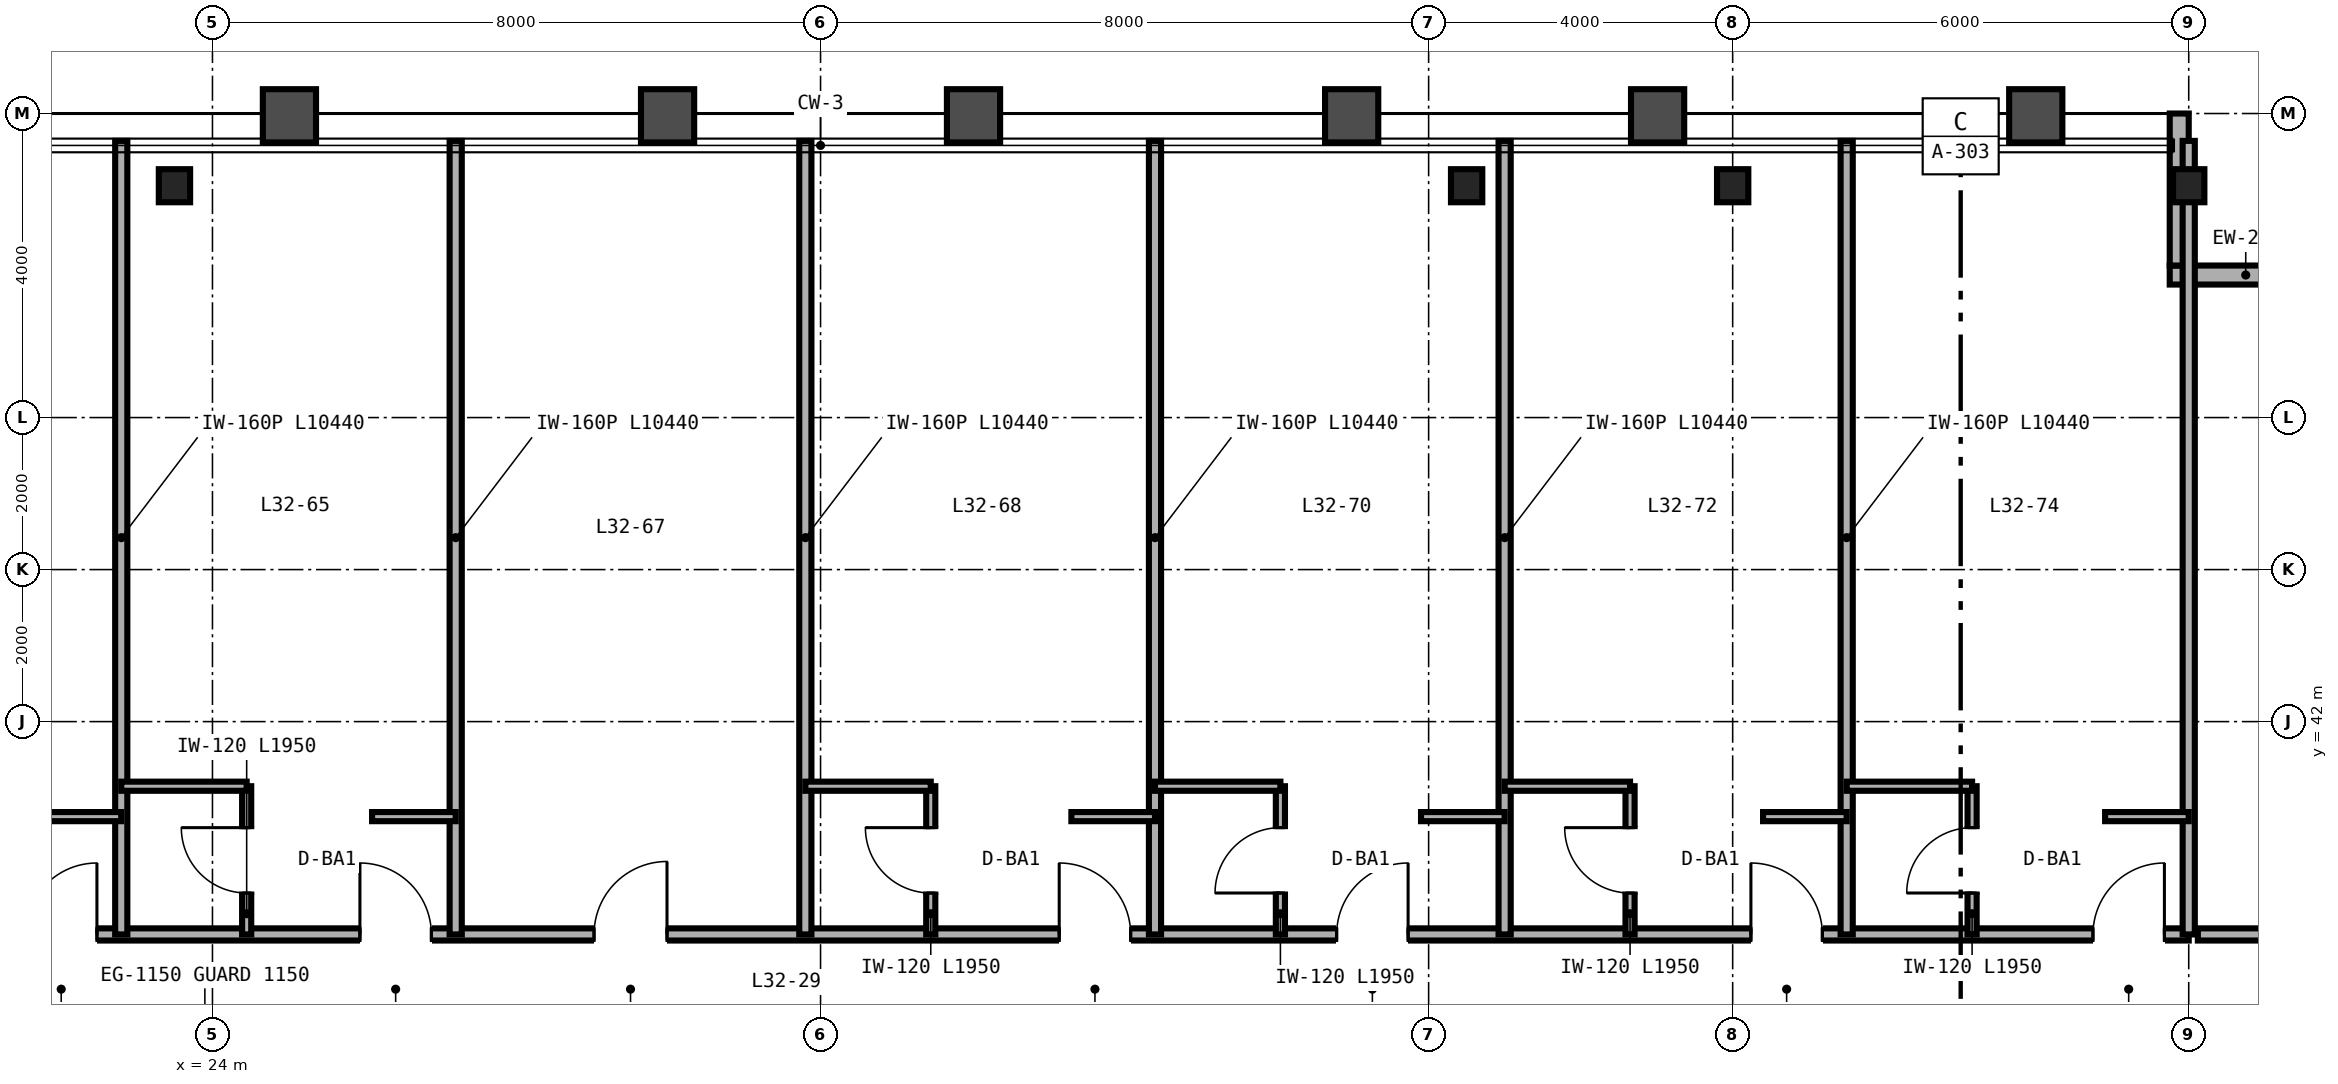
"""IFC4 building model, lengths in metres.
Left out: names, types, materials, properties, quantities, classifications, styles, units other than length and angle.
Written with IfcOpenShell. Run it as: python <this file> out.ifc"""

import sys

from ifc_helpers import new_model, si_unit, direction, frame, frame_2d, origin, origin_2d, place, context, subcontext, project, spatial, rectangle, i_section, extrude, source, transform, mapped, element, fill, save


model = new_model("IFC4")
c1 = context("Model", 3, precision=1e-05, world=origin(), true_north=direction((0.0, 1.0)))
c2 = subcontext(c1, "Body", "Model", "MODEL_VIEW")
j1 = project(units=[si_unit("LENGTHUNIT", "METRE"), si_unit("PLANEANGLEUNIT", "RADIAN")], contexts=[c1])
p1 = place(None, origin())
s1 = spatial("IfcSite", under=j1, at=p1, CompositionType="ELEMENT")
p2 = place(p1, origin())
s2 = spatial("IfcBuilding", under=s1, at=p2, CompositionType="ELEMENT")
p3 = place(p2, frame((0.0, 0.0, 129.6)))
s3 = spatial("IfcBuildingStorey", under=s2, at=p3, CompositionType="ELEMENT", Elevation=129.6)
m1 = source(origin(), c2, "Body", "SweptSolid", [
    extrude(i_section(OverallWidth=0.412, OverallDepth=0.435, WebThickness=0.036, FlangeThickness=0.057, FilletRadius=0.025, at=origin_2d()), origin(), (0.0, 0.0, 1.0), 3.36),
])
for number, where, z_axis, x_axis in (
    (1, (23.5, 49.05, 0.0), (0.0, 0.0, 1.0), (1.0, 0.0, 0.0)),
    (2, (40.5, 49.05, 0.0), (0.0, 0.0, 1.0), (1.0, 0.0, 0.0)),
    (3, (44.0, 49.05, 0.0), (0.0, 0.0, 1.0), (1.0, 0.0, 0.0)),
    (4, (50.0, 49.05, 0.0), (0.0, 0.0, 1.0), (1.0, 0.0, 0.0)),
):
    element("IfcColumn", number, at=place(p3, frame(where, z_axis=z_axis, x_axis=x_axis)), inside=s3, PredefinedType="COLUMN", context=c2, shape_type="MappedRepresentation", body=[
        mapped(m1, transform((0.0, 0.0, 0.0), scale=1.0)),
    ])
p4 = place(p3, frame((51.75, 47.875, 0.0), z_axis=(0.0, 0.0, 1.0), x_axis=(-1.0, 0.0, 0.0)))
e5 = element("IfcWall", 5, at=p4, inside=s3, PredefinedType="SOLIDWALL", context=c2, shape_type="SweptSolid", body=[
    extrude(rectangle(XDim=2.0, YDim=0.25, at=frame_2d((1.0, 0.0))), origin(), (0.0, 0.0, 1.0), 3.36),
])
p5 = place(p3, frame((49.875, 48.0, 0.0), z_axis=(0.0, 0.0, 1.0), x_axis=(0.0, 1.0, 0.0)))
e6 = element("IfcWall", 6, at=p5, inside=s3, PredefinedType="SOLIDWALL", context=c2, shape_type="SweptSolid", body=[
    extrude(rectangle(XDim=2.0, YDim=0.25, at=frame_2d((1.0, 0.0))), origin(), (0.0, 0.0, 1.0), 2.667),
])
p6 = place(p3, frame((50.12, 39.2, 0.0), z_axis=(0.0, 0.0, 1.0), x_axis=(1.0, 0.0, 0.0)))
e7 = element("IfcWall", 7, at=p6, inside=s3, PredefinedType="PARTITIONING", context=c2, shape_type="SweptSolid", body=[
    extrude(rectangle(XDim=5.68, YDim=0.16, at=frame_2d((2.84, 0.0))), origin(), (0.0, 0.0, 1.0), 3.36),
])
p7 = place(p6, frame((2.36, 0.0, 0.0)))
e8 = element("IfcOpeningElement", 8, at=p7, cuts=e7, PredefinedType="OPENING", context=c2, shape_type="SweptSolid", body=[
    extrude(rectangle(XDim=0.96, YDim=2.15, at=frame_2d((0.48, 1.075))), frame((0.0, 0.09, 0.0), z_axis=(0.0, -1.0, 0.0), x_axis=(1.0, 0.0, 0.0)), (0.0, 0.0, 1.0), 0.18),
])
p8 = place(p3, frame((14.0, 39.2, 0.0), z_axis=(0.0, 0.0, 1.0), x_axis=(1.0, 0.0, 0.0)))
e9 = element("IfcWall", 9, at=p8, inside=s3, PredefinedType="PARTITIONING", context=c2, shape_type="SweptSolid", body=[
    extrude(rectangle(XDim=36.0, YDim=0.16, at=frame_2d((18.0, 0.0))), origin(), (0.0, 0.0, 1.0), 2.581),
])
p9 = place(p8, frame((3.14, 0.0, 0.0)))
e10 = element("IfcOpeningElement", 10, at=p9, cuts=e9, PredefinedType="OPENING", context=c2, shape_type="SweptSolid", body=[
    extrude(rectangle(XDim=0.94, YDim=2.15, at=frame_2d((0.47, 1.075))), frame((0.0, 0.09, 0.0), z_axis=(0.0, -1.0, 0.0), x_axis=(1.0, 0.0, 0.0)), (0.0, 0.0, 1.0), 0.18),
])
p10 = place(p8, frame((7.54, 0.0, 0.0)))
e11 = element("IfcOpeningElement", 11, at=p10, cuts=e9, PredefinedType="OPENING", context=c2, shape_type="SweptSolid", body=[
    extrude(rectangle(XDim=0.94, YDim=2.15, at=frame_2d((0.47, 1.075))), frame((0.0, 0.09, 0.0), z_axis=(0.0, -1.0, 0.0), x_axis=(1.0, 0.0, 0.0)), (0.0, 0.0, 1.0), 0.18),
])
p11 = place(p8, frame((11.94, 0.0, 0.0)))
e12 = element("IfcOpeningElement", 12, at=p11, cuts=e9, PredefinedType="OPENING", context=c2, shape_type="SweptSolid", body=[
    extrude(rectangle(XDim=0.94, YDim=2.15, at=frame_2d((0.47, 1.075))), frame((0.0, 0.09, 0.0), z_axis=(0.0, -1.0, 0.0), x_axis=(1.0, 0.0, 0.0)), (0.0, 0.0, 1.0), 0.18),
])
p12 = place(p8, frame((15.02, 0.0, 0.0)))
e13 = element("IfcOpeningElement", 13, at=p12, cuts=e9, PredefinedType="OPENING", context=c2, shape_type="SweptSolid", body=[
    extrude(rectangle(XDim=0.96, YDim=2.15, at=frame_2d((0.48, 1.075))), frame((0.0, 0.09, 0.0), z_axis=(0.0, -1.0, 0.0), x_axis=(1.0, 0.0, 0.0)), (0.0, 0.0, 1.0), 0.18),
])
p13 = place(p8, frame((21.14, 0.0, 0.0)))
e14 = element("IfcOpeningElement", 14, at=p13, cuts=e9, PredefinedType="OPENING", context=c2, shape_type="SweptSolid", body=[
    extrude(rectangle(XDim=0.94, YDim=2.15, at=frame_2d((0.47, 1.075))), frame((0.0, 0.09, 0.0), z_axis=(0.0, -1.0, 0.0), x_axis=(1.0, 0.0, 0.0)), (0.0, 0.0, 1.0), 0.18),
])
p14 = place(p8, frame((24.79, 0.0, 0.0)))
e15 = element("IfcOpeningElement", 15, at=p14, cuts=e9, PredefinedType="OPENING", context=c2, shape_type="SweptSolid", body=[
    extrude(rectangle(XDim=0.94, YDim=2.15, at=frame_2d((0.47, 1.075))), frame((0.0, 0.09, 0.0), z_axis=(0.0, -1.0, 0.0), x_axis=(1.0, 0.0, 0.0)), (0.0, 0.0, 1.0), 0.18),
])
p15 = place(p8, frame((30.24, 0.0, 0.0)))
e16 = element("IfcOpeningElement", 16, at=p15, cuts=e9, PredefinedType="OPENING", context=c2, shape_type="SweptSolid", body=[
    extrude(rectangle(XDim=0.94, YDim=2.15, at=frame_2d((0.47, 1.075))), frame((0.0, 0.09, 0.0), z_axis=(0.0, -1.0, 0.0), x_axis=(1.0, 0.0, 0.0)), (0.0, 0.0, 1.0), 0.18),
])
p16 = place(p8, frame((34.74, 0.0, 0.0)))
e17 = element("IfcOpeningElement", 17, at=p16, cuts=e9, PredefinedType="OPENING", context=c2, shape_type="SweptSolid", body=[
    extrude(rectangle(XDim=0.94, YDim=2.15, at=frame_2d((0.47, 1.075))), frame((0.0, 0.09, 0.0), z_axis=(0.0, -1.0, 0.0), x_axis=(1.0, 0.0, 0.0)), (0.0, 0.0, 1.0), 0.18),
])
p17 = place(p3, frame((50.0, 39.2, 0.0), z_axis=(0.0, 0.0, 1.0), x_axis=(0.0, 1.0, 0.0)))
e18 = element("IfcWall", 18, at=p17, inside=s3, PredefinedType="PARTITIONING", context=c2, shape_type="SweptSolid", body=[
    extrude(rectangle(XDim=10.44, YDim=0.16, at=frame_2d((5.22, 0.0))), origin(), (0.0, 0.0, 1.0), 2.667),
])
p18 = place(p3, frame((22.8, 39.2, 0.0), z_axis=(0.0, 0.0, 1.0), x_axis=(0.0, 1.0, 0.0)))
e19 = element("IfcWall", 19, at=p18, inside=s3, PredefinedType="PARTITIONING", context=c2, shape_type="SweptSolid", body=[
    extrude(rectangle(XDim=10.44, YDim=0.16, at=frame_2d((5.22, 0.0))), origin(), (0.0, 0.0, 1.0), 2.823),
])
p19 = place(p3, frame((21.7, 40.75, 0.0), z_axis=(0.0, 0.0, 1.0), x_axis=(1.0, 0.0, 0.0)))
e20 = element("IfcWall", 20, at=p19, inside=s3, PredefinedType="PARTITIONING", context=c2, shape_type="SweptSolid", body=[
    extrude(rectangle(XDim=1.1, YDim=0.12, at=frame_2d((0.55, 0.0))), origin(), (0.0, 0.0, 1.0), 3.36),
])
p20 = place(p3, frame((27.2, 39.2, 0.0), z_axis=(0.0, 0.0, 1.0), x_axis=(0.0, 1.0, 0.0)))
e21 = element("IfcWall", 21, at=p20, inside=s3, PredefinedType="PARTITIONING", context=c2, shape_type="SweptSolid", body=[
    extrude(rectangle(XDim=10.44, YDim=0.16, at=frame_2d((5.22, 0.0))), origin(), (0.0, 0.0, 1.0), 2.433),
])
p21 = place(p3, frame((24.45, 39.2, 0.0), z_axis=(0.0, 0.0, 1.0), x_axis=(0.0, 1.0, 0.0)))
e22 = element("IfcWall", 22, at=p21, inside=s3, PredefinedType="PARTITIONING", context=c2, shape_type="SweptSolid", body=[
    extrude(rectangle(XDim=1.95, YDim=0.12, at=frame_2d((0.975, 0.0))), origin(), (0.0, 0.0, 1.0), 3.36),
])
p22 = place(p21, frame((0.545, 0.0, 0.0)))
e23 = element("IfcOpeningElement", 23, at=p22, cuts=e22, PredefinedType="OPENING", context=c2, shape_type="SweptSolid", body=[
    extrude(rectangle(XDim=0.86, YDim=2.1, at=frame_2d((0.43, 1.05))), frame((0.0, 0.07, 0.0), z_axis=(0.0, -1.0, 0.0), x_axis=(1.0, 0.0, 0.0)), (0.0, 0.0, 1.0), 0.14),
])
p23 = place(p3, frame((22.8, 41.15, 0.0), z_axis=(0.0, 0.0, 1.0), x_axis=(1.0, 0.0, 0.0)))
e24 = element("IfcWall", 24, at=p23, inside=s3, PredefinedType="PARTITIONING", context=c2, shape_type="SweptSolid", body=[
    extrude(rectangle(XDim=1.65, YDim=0.12, at=frame_2d((0.825, 0.0))), origin(), (0.0, 0.0, 1.0), 2.581),
])
p24 = place(p3, frame((26.1, 40.75, 0.0), z_axis=(0.0, 0.0, 1.0), x_axis=(1.0, 0.0, 0.0)))
e25 = element("IfcWall", 25, at=p24, inside=s3, PredefinedType="PARTITIONING", context=c2, shape_type="SweptSolid", body=[
    extrude(rectangle(XDim=1.1, YDim=0.12, at=frame_2d((0.55, 0.0))), origin(), (0.0, 0.0, 1.0), 3.36),
])
for number, where, z_axis, x_axis in (
    (26, (31.8, 39.2, 0.0), (0.0, 0.0, 1.0), (0.0, 1.0, 0.0)),
    (27, (36.4, 39.2, 0.0), (0.0, 0.0, 1.0), (0.0, 1.0, 0.0)),
):
    element("IfcWall", number, at=place(p3, frame(where, z_axis=z_axis, x_axis=x_axis)), inside=s3, PredefinedType="PARTITIONING", context=c2, shape_type="SweptSolid", body=[
        extrude(rectangle(XDim=10.44, YDim=0.16, at=frame_2d((5.22, 0.0))), origin(), (0.0, 0.0, 1.0), 2.433),
    ])
p25 = place(p3, frame((33.45, 39.2, 0.0), z_axis=(0.0, 0.0, 1.0), x_axis=(0.0, 1.0, 0.0)))
e28 = element("IfcWall", 28, at=p25, inside=s3, PredefinedType="PARTITIONING", context=c2, shape_type="SweptSolid", body=[
    extrude(rectangle(XDim=1.95, YDim=0.12, at=frame_2d((0.975, 0.0))), origin(), (0.0, 0.0, 1.0), 3.36),
])
p26 = place(p25, frame((0.545, 0.0, 0.0)))
e29 = element("IfcOpeningElement", 29, at=p26, cuts=e28, PredefinedType="OPENING", context=c2, shape_type="SweptSolid", body=[
    extrude(rectangle(XDim=0.86, YDim=2.1, at=frame_2d((0.43, 1.05))), frame((0.0, 0.07, 0.0), z_axis=(0.0, -1.0, 0.0), x_axis=(1.0, 0.0, 0.0)), (0.0, 0.0, 1.0), 0.14),
])
p27 = place(p3, frame((31.8, 41.15, 0.0), z_axis=(0.0, 0.0, 1.0), x_axis=(1.0, 0.0, 0.0)))
e30 = element("IfcWall", 30, at=p27, inside=s3, PredefinedType="PARTITIONING", context=c2, shape_type="SweptSolid", body=[
    extrude(rectangle(XDim=1.65, YDim=0.12, at=frame_2d((0.825, 0.0))), origin(), (0.0, 0.0, 1.0), 3.36),
])
p28 = place(p3, frame((35.3, 40.75, 0.0), z_axis=(0.0, 0.0, 1.0), x_axis=(1.0, 0.0, 0.0)))
e31 = element("IfcWall", 31, at=p28, inside=s3, PredefinedType="PARTITIONING", context=c2, shape_type="SweptSolid", body=[
    extrude(rectangle(XDim=1.1, YDim=0.12, at=frame_2d((0.55, 0.0))), origin(), (0.0, 0.0, 1.0), 3.36),
])
p29 = place(p3, frame((41.0, 39.2, 0.0), z_axis=(0.0, 0.0, 1.0), x_axis=(0.0, 1.0, 0.0)))
e32 = element("IfcWall", 32, at=p29, inside=s3, PredefinedType="PARTITIONING", context=c2, shape_type="SweptSolid", body=[
    extrude(rectangle(XDim=10.44, YDim=0.16, at=frame_2d((5.22, 0.0))), origin(), (0.0, 0.0, 1.0), 2.823),
])
p30 = place(p3, frame((38.05, 39.2, 0.0), z_axis=(0.0, 0.0, 1.0), x_axis=(0.0, 1.0, 0.0)))
e33 = element("IfcWall", 33, at=p30, inside=s3, PredefinedType="PARTITIONING", context=c2, shape_type="SweptSolid", body=[
    extrude(rectangle(XDim=1.95, YDim=0.12, at=frame_2d((0.975, 0.0))), origin(), (0.0, 0.0, 1.0), 3.36),
])
p31 = place(p30, frame((0.545, 0.0, 0.0)))
e34 = element("IfcOpeningElement", 34, at=p31, cuts=e33, PredefinedType="OPENING", context=c2, shape_type="SweptSolid", body=[
    extrude(rectangle(XDim=0.86, YDim=2.1, at=frame_2d((0.43, 1.05))), frame((0.0, 0.07, 0.0), z_axis=(0.0, -1.0, 0.0), x_axis=(1.0, 0.0, 0.0)), (0.0, 0.0, 1.0), 0.14),
])
p32 = place(p3, frame((36.4, 41.15, 0.0), z_axis=(0.0, 0.0, 1.0), x_axis=(1.0, 0.0, 0.0)))
e35 = element("IfcWall", 35, at=p32, inside=s3, PredefinedType="PARTITIONING", context=c2, shape_type="SweptSolid", body=[
    extrude(rectangle(XDim=1.65, YDim=0.12, at=frame_2d((0.825, 0.0))), origin(), (0.0, 0.0, 1.0), 3.36),
])
p33 = place(p3, frame((39.9, 40.75, 0.0), z_axis=(0.0, 0.0, 1.0), x_axis=(1.0, 0.0, 0.0)))
e36 = element("IfcWall", 36, at=p33, inside=s3, PredefinedType="PARTITIONING", context=c2, shape_type="SweptSolid", body=[
    extrude(rectangle(XDim=1.1, YDim=0.12, at=frame_2d((0.55, 0.0))), origin(), (0.0, 0.0, 1.0), 2.581),
])
p34 = place(p3, frame((45.5, 39.2, 0.0), z_axis=(0.0, 0.0, 1.0), x_axis=(0.0, 1.0, 0.0)))
e37 = element("IfcWall", 37, at=p34, inside=s3, PredefinedType="PARTITIONING", context=c2, shape_type="SweptSolid", body=[
    extrude(rectangle(XDim=10.44, YDim=0.16, at=frame_2d((5.22, 0.0))), origin(), (0.0, 0.0, 1.0), 2.667),
])
p35 = place(p3, frame((42.65, 39.2, 0.0), z_axis=(0.0, 0.0, 1.0), x_axis=(0.0, 1.0, 0.0)))
e38 = element("IfcWall", 38, at=p35, inside=s3, PredefinedType="PARTITIONING", context=c2, shape_type="SweptSolid", body=[
    extrude(rectangle(XDim=1.95, YDim=0.12, at=frame_2d((0.975, 0.0))), origin(), (0.0, 0.0, 1.0), 3.36),
])
p36 = place(p35, frame((0.545, 0.0, 0.0)))
e39 = element("IfcOpeningElement", 39, at=p36, cuts=e38, PredefinedType="OPENING", context=c2, shape_type="SweptSolid", body=[
    extrude(rectangle(XDim=0.86, YDim=2.1, at=frame_2d((0.43, 1.05))), frame((0.0, 0.07, 0.0), z_axis=(0.0, -1.0, 0.0), x_axis=(1.0, 0.0, 0.0)), (0.0, 0.0, 1.0), 0.14),
])
p37 = place(p3, frame((41.0, 41.15, 0.0), z_axis=(0.0, 0.0, 1.0), x_axis=(1.0, 0.0, 0.0)))
e40 = element("IfcWall", 40, at=p37, inside=s3, PredefinedType="PARTITIONING", context=c2, shape_type="SweptSolid", body=[
    extrude(rectangle(XDim=1.65, YDim=0.12, at=frame_2d((0.825, 0.0))), origin(), (0.0, 0.0, 1.0), 3.36),
])
p38 = place(p3, frame((44.4, 40.75, 0.0), z_axis=(0.0, 0.0, 1.0), x_axis=(1.0, 0.0, 0.0)))
e41 = element("IfcWall", 41, at=p38, inside=s3, PredefinedType="PARTITIONING", context=c2, shape_type="SweptSolid", body=[
    extrude(rectangle(XDim=1.1, YDim=0.12, at=frame_2d((0.55, 0.0))), origin(), (0.0, 0.0, 1.0), 3.36),
])
p39 = place(p3, frame((47.15, 39.2, 0.0), z_axis=(0.0, 0.0, 1.0), x_axis=(0.0, 1.0, 0.0)))
e42 = element("IfcWall", 42, at=p39, inside=s3, PredefinedType="PARTITIONING", context=c2, shape_type="SweptSolid", body=[
    extrude(rectangle(XDim=1.95, YDim=0.12, at=frame_2d((0.975, 0.0))), origin(), (0.0, 0.0, 1.0), 3.36),
])
p40 = place(p39, frame((0.545, 0.0, 0.0)))
e43 = element("IfcOpeningElement", 43, at=p40, cuts=e42, PredefinedType="OPENING", context=c2, shape_type="SweptSolid", body=[
    extrude(rectangle(XDim=0.86, YDim=2.1, at=frame_2d((0.43, 1.05))), frame((0.0, 0.07, 0.0), z_axis=(0.0, -1.0, 0.0), x_axis=(1.0, 0.0, 0.0)), (0.0, 0.0, 1.0), 0.14),
])
p41 = place(p3, frame((45.5, 41.15, 0.0), z_axis=(0.0, 0.0, 1.0), x_axis=(1.0, 0.0, 0.0)))
e44 = element("IfcWall", 44, at=p41, inside=s3, PredefinedType="PARTITIONING", context=c2, shape_type="SweptSolid", body=[
    extrude(rectangle(XDim=1.65, YDim=0.12, at=frame_2d((0.825, 0.0))), origin(), (0.0, 0.0, 1.0), 3.36),
])
p42 = place(p3, frame((48.9, 40.75, 0.0), z_axis=(0.0, 0.0, 1.0), x_axis=(1.0, 0.0, 0.0)))
e45 = element("IfcWall", 45, at=p42, inside=s3, PredefinedType="PARTITIONING", context=c2, shape_type="SweptSolid", body=[
    extrude(rectangle(XDim=1.1, YDim=0.12, at=frame_2d((0.55, 0.0))), origin(), (0.0, 0.0, 1.0), 3.36),
])
m2 = source(origin(), c2, "Body", "SweptSolid", [
    extrude(rectangle(XDim=0.86, YDim=2.1, at=frame_2d((0.43, 1.05))), frame((0.0, 0.025, 0.0), z_axis=(0.0, -1.0, 0.0), x_axis=(1.0, 0.0, 0.0)), (0.0, 0.0, 1.0), 0.05),
])
p43 = place(p22, origin())
e46 = element("IfcDoor", 46, at=p43, inside=s3, OperationType="SINGLE_SWING_RIGHT", PredefinedType="DOOR", context=c2, shape_type="MappedRepresentation", body=[
    mapped(m2, transform((0.0, 0.0, 0.0), scale=1.0)),
])
fill(e23, e46)
p44 = place(p26, origin())
e47 = element("IfcDoor", 47, at=p44, inside=s3, OperationType="SINGLE_SWING_RIGHT", PredefinedType="DOOR", context=c2, shape_type="MappedRepresentation", body=[
    mapped(m2, transform((0.0, 0.0, 0.0), scale=1.0)),
])
fill(e29, e47)
p45 = place(p31, origin())
e48 = element("IfcDoor", 48, at=p45, inside=s3, OperationType="SINGLE_SWING_LEFT", PredefinedType="DOOR", context=c2, shape_type="MappedRepresentation", body=[
    mapped(m2, transform((0.0, 0.0, 0.0), scale=1.0)),
])
fill(e34, e48)
p46 = place(p36, origin())
e49 = element("IfcDoor", 49, at=p46, inside=s3, OperationType="SINGLE_SWING_RIGHT", PredefinedType="DOOR", context=c2, shape_type="MappedRepresentation", body=[
    mapped(m2, transform((0.0, 0.0, 0.0), scale=1.0)),
])
fill(e39, e49)
p47 = place(p40, origin())
e50 = element("IfcDoor", 50, at=p47, inside=s3, OperationType="SINGLE_SWING_LEFT", PredefinedType="DOOR", context=c2, shape_type="MappedRepresentation", body=[
    mapped(m2, transform((0.0, 0.0, 0.0), scale=1.0)),
])
fill(e43, e50)
m3 = source(origin(), c2, "Body", "SweptSolid", [
    extrude(rectangle(XDim=0.94, YDim=2.15, at=frame_2d((0.47, 1.075))), frame((0.0, 0.025, 0.0), z_axis=(0.0, -1.0, 0.0), x_axis=(1.0, 0.0, 0.0)), (0.0, 0.0, 1.0), 0.05),
])
p48 = place(p10, origin())
e51 = element("IfcDoor", 51, at=p48, inside=s3, OperationType="SINGLE_SWING_RIGHT", PredefinedType="DOOR", context=c2, shape_type="MappedRepresentation", body=[
    mapped(m3, transform((0.0, 0.0, 0.0), scale=1.0)),
])
fill(e11, e51)
p49 = place(p11, origin())
e52 = element("IfcDoor", 52, at=p49, inside=s3, OperationType="SINGLE_SWING_LEFT", PredefinedType="DOOR", context=c2, shape_type="MappedRepresentation", body=[
    mapped(m3, transform((0.0, 0.0, 0.0), scale=1.0)),
])
fill(e12, e52)
m4 = source(origin(), c2, "Body", "SweptSolid", [
    extrude(rectangle(XDim=0.96, YDim=2.15, at=frame_2d((0.48, 1.075))), frame((0.0, 0.025, 0.0), z_axis=(0.0, -1.0, 0.0), x_axis=(1.0, 0.0, 0.0)), (0.0, 0.0, 1.0), 0.05),
])
p50 = place(p12, origin())
e53 = element("IfcDoor", 53, at=p50, inside=s3, OperationType="SINGLE_SWING_RIGHT", PredefinedType="DOOR", context=c2, shape_type="MappedRepresentation", body=[
    mapped(m4, transform((0.0, 0.0, 0.0), scale=1.0)),
])
fill(e13, e53)
p51 = place(p13, origin())
e54 = element("IfcDoor", 54, at=p51, inside=s3, OperationType="SINGLE_SWING_LEFT", PredefinedType="DOOR", context=c2, shape_type="MappedRepresentation", body=[
    mapped(m3, transform((0.0, 0.0, 0.0), scale=1.0)),
])
fill(e14, e54)
p52 = place(p14, origin())
e55 = element("IfcDoor", 55, at=p52, inside=s3, OperationType="SINGLE_SWING_RIGHT", PredefinedType="DOOR", context=c2, shape_type="MappedRepresentation", body=[
    mapped(m3, transform((0.0, 0.0, 0.0), scale=1.0)),
])
fill(e15, e55)
p53 = place(p15, origin())
e56 = element("IfcDoor", 56, at=p53, inside=s3, OperationType="SINGLE_SWING_LEFT", PredefinedType="DOOR", context=c2, shape_type="MappedRepresentation", body=[
    mapped(m3, transform((0.0, 0.0, 0.0), scale=1.0)),
])
fill(e16, e56)
p54 = place(p16, origin())
e57 = element("IfcDoor", 57, at=p54, inside=s3, OperationType="SINGLE_SWING_RIGHT", PredefinedType="DOOR", context=c2, shape_type="MappedRepresentation", body=[
    mapped(m3, transform((0.0, 0.0, 0.0), scale=1.0)),
])
fill(e17, e57)
save(model, sys.argv[1])
